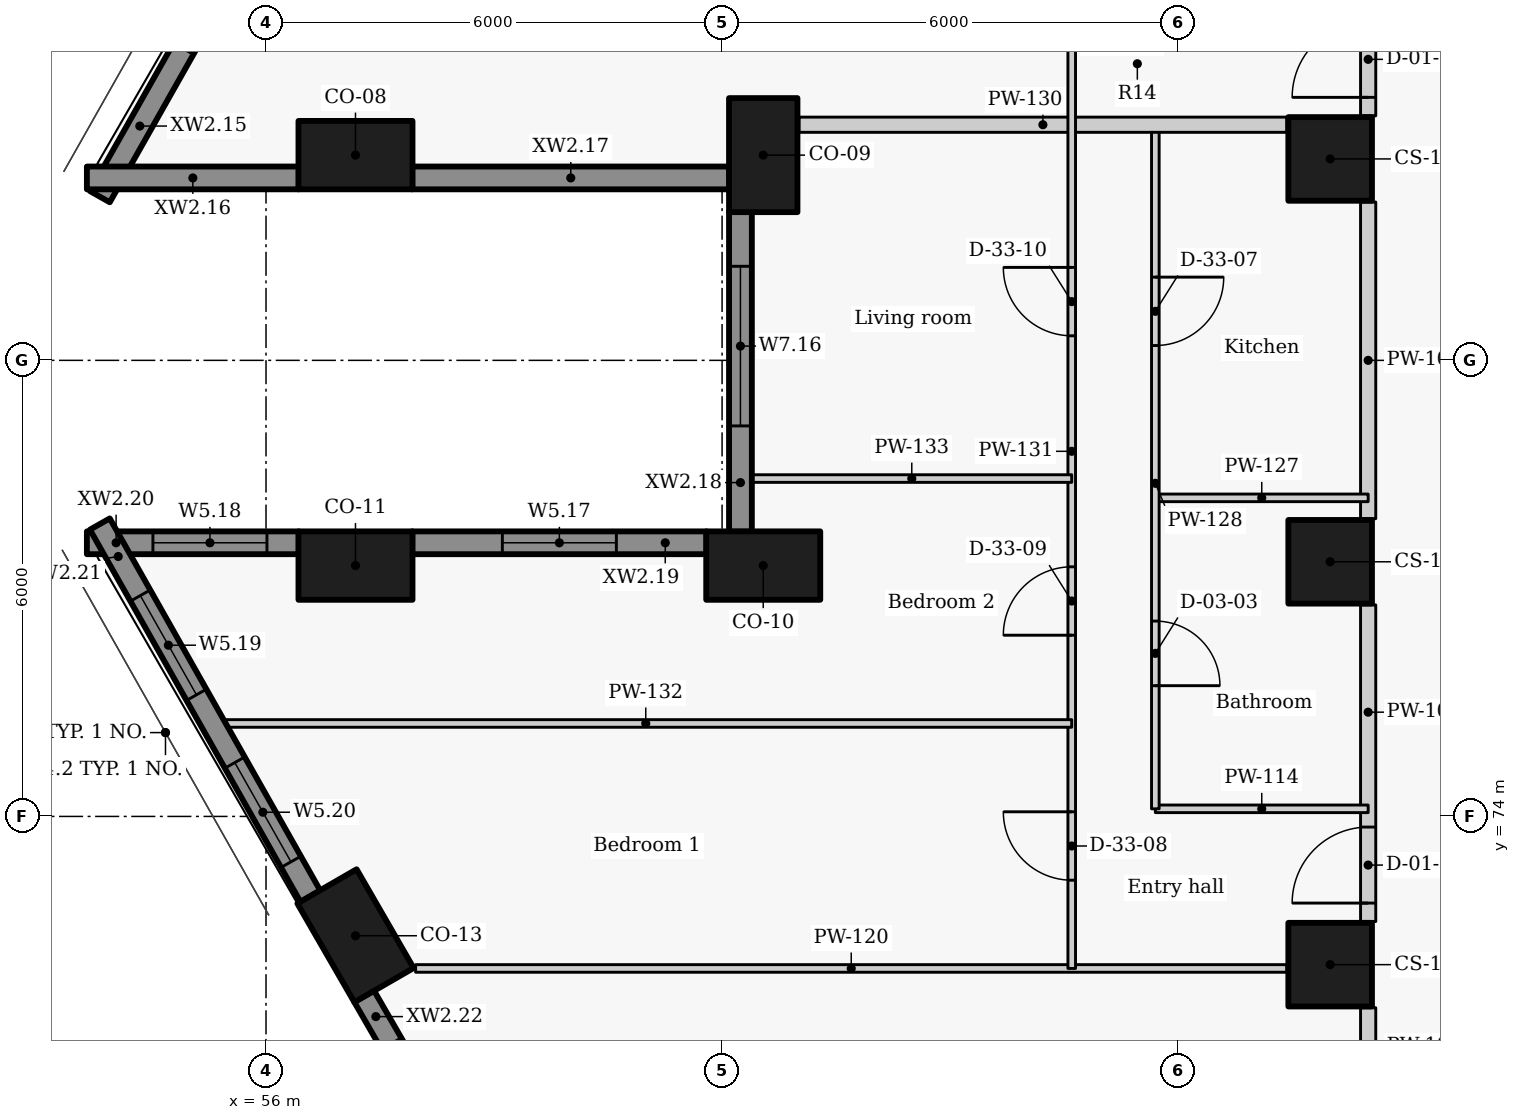
"""IFC4 building model, lengths in metres.
Left out: names, types, materials, properties, quantities, classifications, styles, units other than length and angle.
Written with IfcOpenShell. Run it as: python <this file> out.ifc"""

import sys

from ifc_helpers import new_model, si_unit, direction, frame, frame_2d, origin, origin_2d, place, context, subcontext, project, spatial, rectangle, extrude, element, fill, save


model = new_model("IFC4")
c1 = context("Model", 3, precision=1e-05, world=origin(), true_north=direction((0.0, 1.0)))
c2 = subcontext(c1, "Body", "Model", "MODEL_VIEW")
j1 = project(units=[si_unit("LENGTHUNIT", "METRE"), si_unit("PLANEANGLEUNIT", "RADIAN")], contexts=[c1])
p1 = place(None, origin())
s1 = spatial("IfcSite", under=j1, at=p1, CompositionType="ELEMENT")
p2 = place(p1, origin())
s2 = spatial("IfcBuilding", under=s1, at=p2, CompositionType="ELEMENT")
p3 = place(p2, frame((0.0, 0.0, 41.4)))
s3 = spatial("IfcBuildingStorey", under=s2, at=p3, CompositionType="ELEMENT", Elevation=41.4)
for number, where, z_axis, x_axis in (
    (1, (57.177, 82.7, -0.275), (0.0, 0.0, 1.0), (1.0, 0.0, 0.0)),
    (2, (62.542, 82.7, -0.275), (0.0, 0.0, 1.0), (0.0, -1.0, 0.0)),
    (3, (62.542, 77.3, -0.275), (0.0, 0.0, 1.0), (-1.0, 0.0, 0.0)),
    (4, (57.177, 77.3, -0.275), (0.0, 0.0, 1.0), (-1.0, 0.0, 0.0)),
    (5, (57.177, 72.43, -0.275), (0.0, 0.0, 1.0), (0.5, -0.866, 0.0)),
):
    element("IfcColumn", number, at=place(p3, frame(where, z_axis=z_axis, x_axis=x_axis)), inside=s3, PredefinedType="COLUMN", context=c2, shape_type="SweptSolid", body=[
        extrude(rectangle(XDim=1.5, YDim=0.9, at=origin_2d()), origin(), (0.0, 0.0, 1.0), 3.575),
    ])
for number, where, z_axis, x_axis in (
    (6, (70.0, 82.65, -0.275), (0.0, 0.0, 1.0), (0.0, -1.0, 0.0)),
    (7, (70.0, 77.35, -0.275), (0.0, 0.0, 1.0), (0.0, -1.0, 0.0)),
):
    element("IfcColumn", number, at=place(p3, frame(where, z_axis=z_axis, x_axis=x_axis)), inside=s3, PredefinedType="COLUMN", context=c2, shape_type="SweptSolid", body=[
        extrude(rectangle(XDim=1.1, YDim=1.1, at=origin_2d()), origin(), (0.0, 0.0, 1.0), 3.575),
    ])
p4 = place(p3, frame((70.0, 72.05, 0.0), z_axis=(0.0, 0.0, 1.0), x_axis=(0.0, -1.0, 0.0)))
e8 = element("IfcColumn", 8, at=p4, inside=s3, PredefinedType="COLUMN", context=c2, shape_type="SweptSolid", body=[
    extrude(rectangle(XDim=1.1, YDim=1.1, at=origin_2d()), origin(), (0.0, 0.0, 1.0), 3.3),
])
p5 = place(p3, frame((56.584, 87.051, 0.0), z_axis=(0.0, 0.0, 1.0), x_axis=(-0.492363204642, -0.870389840655, 0.0)))
e9 = element("IfcWall", 9, at=p5, inside=s3, PredefinedType="SOLIDWALL", context=c2, shape_type="SweptSolid", body=[
    extrude(rectangle(XDim=5.626, YDim=0.3, at=frame_2d((2.813, 0.0))), origin(), (0.0, 0.0, 1.0), 2.425),
])
p6 = place(p5, frame((1.892, 0.0, 0.9)))
e10 = element("IfcOpeningElement", 10, at=p6, cuts=e9, PredefinedType="OPENING", context=c2, shape_type="SweptSolid", body=[
    extrude(rectangle(XDim=1.5, YDim=1.1, at=frame_2d((0.75, 0.55))), frame((0.0, 0.16, 0.0), z_axis=(0.0, -1.0, 0.0), x_axis=(1.0, 0.0, 0.0)), (0.0, 0.0, 1.0), 0.32),
])
p7 = place(p3, frame((53.643, 82.4, 0.0), z_axis=(0.0, 0.0, 1.0), x_axis=(1.0, 0.0, 0.0)))
e11 = element("IfcWall", 11, at=p7, inside=s3, PredefinedType="SOLIDWALL", context=c2, shape_type="SweptSolid", body=[
    extrude(rectangle(XDim=2.788, YDim=0.3, at=frame_2d((1.394, 0.0))), origin(), (0.0, 0.0, 1.0), 2.425),
])
p8 = place(p3, frame((57.923, 82.4, 0.0), z_axis=(0.0, 0.0, 1.0), x_axis=(1.0, 0.0, 0.0)))
e12 = element("IfcWall", 12, at=p8, inside=s3, PredefinedType="SOLIDWALL", context=c2, shape_type="SweptSolid", body=[
    extrude(rectangle(XDim=4.173, YDim=0.3, at=frame_2d((2.086, 0.0))), origin(), (0.0, 0.0, 1.0), 2.425),
])
p9 = place(p3, frame((62.242, 81.954, 0.0), z_axis=(0.0, 0.0, 1.0), x_axis=(0.0, -1.0, 0.0)))
e13 = element("IfcWall", 13, at=p9, inside=s3, PredefinedType="SOLIDWALL", context=c2, shape_type="SweptSolid", body=[
    extrude(rectangle(XDim=4.208, YDim=0.3, at=frame_2d((2.104, 0.0))), origin(), (0.0, 0.0, 1.0), 2.425),
])
p10 = place(p9, frame((0.716, 0.0, 0.9)))
e14 = element("IfcOpeningElement", 14, at=p10, cuts=e13, PredefinedType="OPENING", context=c2, shape_type="SweptSolid", body=[
    extrude(rectangle(XDim=2.1, YDim=1.1, at=frame_2d((1.05, 0.55))), frame((0.0, 0.16, 0.0), z_axis=(0.0, -1.0, 0.0), x_axis=(1.0, 0.0, 0.0)), (0.0, 0.0, 1.0), 0.32),
])
p11 = place(p3, frame((61.796, 77.6, 0.0), z_axis=(0.0, 0.0, 1.0), x_axis=(-1.0, 0.0, 0.0)))
e15 = element("IfcWall", 15, at=p11, inside=s3, PredefinedType="SOLIDWALL", context=c2, shape_type="SweptSolid", body=[
    extrude(rectangle(XDim=3.873, YDim=0.3, at=frame_2d((1.936, 0.0))), origin(), (0.0, 0.0, 1.0), 2.425),
])
p12 = place(p11, frame((1.186, 0.0, 0.9)))
e16 = element("IfcOpeningElement", 16, at=p12, cuts=e15, PredefinedType="OPENING", context=c2, shape_type="SweptSolid", body=[
    extrude(rectangle(XDim=1.5, YDim=1.1, at=frame_2d((0.75, 0.55))), frame((0.0, 0.16, 0.0), z_axis=(0.0, -1.0, 0.0), x_axis=(1.0, 0.0, 0.0)), (0.0, 0.0, 1.0), 0.32),
])
p13 = place(p3, frame((56.431, 77.6, 0.0), z_axis=(0.0, 0.0, 1.0), x_axis=(-1.0, 0.0, 0.0)))
e17 = element("IfcWall", 17, at=p13, inside=s3, PredefinedType="SOLIDWALL", context=c2, shape_type="SweptSolid", body=[
    extrude(rectangle(XDim=2.788, YDim=0.3, at=frame_2d((1.394, 0.0))), origin(), (0.0, 0.0, 1.0), 2.425),
])
p14 = place(p13, frame((0.419, 0.0, 0.9)))
e18 = element("IfcOpeningElement", 18, at=p14, cuts=e17, PredefinedType="OPENING", context=c2, shape_type="SweptSolid", body=[
    extrude(rectangle(XDim=1.5, YDim=1.1, at=frame_2d((0.75, 0.55))), frame((0.0, 0.16, 0.0), z_axis=(0.0, -1.0, 0.0), x_axis=(1.0, 0.0, 0.0)), (0.0, 0.0, 1.0), 0.32),
])
p15 = place(p3, frame((53.814, 77.847, 0.0), z_axis=(0.0, 0.0, 1.0), x_axis=(0.492363204642, -0.870389840655, 0.0)))
e19 = element("IfcWall", 19, at=p15, inside=s3, PredefinedType="SOLIDWALL", context=c2, shape_type="SweptSolid", body=[
    extrude(rectangle(XDim=5.626, YDim=0.3, at=frame_2d((2.813, 0.0))), origin(), (0.0, 0.0, 1.0), 2.425),
])
p16 = place(p15, frame((1.081, 0.0, 0.9)))
e20 = element("IfcOpeningElement", 20, at=p16, cuts=e19, PredefinedType="OPENING", context=c2, shape_type="SweptSolid", body=[
    extrude(rectangle(XDim=1.5, YDim=1.1, at=frame_2d((0.75, 0.55))), frame((0.0, 0.16, 0.0), z_axis=(0.0, -1.0, 0.0), x_axis=(1.0, 0.0, 0.0)), (0.0, 0.0, 1.0), 0.32),
])
p17 = place(p15, frame((3.606, 0.0, 0.9)))
e21 = element("IfcOpeningElement", 21, at=p17, cuts=e19, PredefinedType="OPENING", context=c2, shape_type="SweptSolid", body=[
    extrude(rectangle(XDim=1.5, YDim=1.1, at=frame_2d((0.75, 0.55))), frame((0.0, 0.16, 0.0), z_axis=(0.0, -1.0, 0.0), x_axis=(1.0, 0.0, 0.0)), (0.0, 0.0, 1.0), 0.32),
])
p18 = place(p3, frame((57.29, 71.634, 0.0), z_axis=(0.0, 0.0, 1.0), x_axis=(0.499977402622, -0.866038449993, 0.0)))
e22 = element("IfcWall", 22, at=p18, inside=s3, PredefinedType="SOLIDWALL", context=c2, shape_type="SweptSolid", body=[
    extrude(rectangle(XDim=3.537, YDim=0.3, at=frame_2d((1.769, 0.0))), origin(), (0.0, 0.0, 1.0), 2.425),
])
p19 = place(p18, frame((0.719, 0.0, 0.9)))
e23 = element("IfcOpeningElement", 23, at=p19, cuts=e22, PredefinedType="OPENING", context=c2, shape_type="SweptSolid", body=[
    extrude(rectangle(XDim=2.1, YDim=1.1, at=frame_2d((1.05, 0.55))), frame((0.0, 0.16, 0.0), z_axis=(0.0, -1.0, 0.0), x_axis=(1.0, 0.0, 0.0)), (0.0, 0.0, 1.0), 0.32),
])
p20 = place(p3, frame((70.5, 68.267, 0.0), z_axis=(0.0, 0.0, 1.0), x_axis=(0.0, 1.0, 0.0)))
e24 = element("IfcWall", 24, at=p20, inside=s3, PredefinedType="PARTITIONING", context=c2, shape_type="SweptSolid", body=[
    extrude(rectangle(XDim=3.216, YDim=0.2, at=frame_2d((1.608, 0.0))), origin(), (0.0, 0.0, 1.0), 3.025),
])
p21 = place(p20, frame((1.108, 0.0, 0.0)))
e25 = element("IfcOpeningElement", 25, at=p21, cuts=e24, PredefinedType="OPENING", context=c2, shape_type="SweptSolid", body=[
    extrude(rectangle(XDim=1.0, YDim=2.1, at=frame_2d((0.5, 1.05))), frame((0.0, 0.11, 0.0), z_axis=(0.0, -1.0, 0.0), x_axis=(1.0, 0.0, 0.0)), (0.0, 0.0, 1.0), 0.22),
])
p22 = place(p3, frame((70.5, 72.617, 0.0), z_axis=(0.0, 0.0, 1.0), x_axis=(0.0, 1.0, 0.0)))
e26 = element("IfcWall", 26, at=p22, inside=s3, PredefinedType="PARTITIONING", context=c2, shape_type="SweptSolid", body=[
    extrude(rectangle(XDim=4.166, YDim=0.2, at=frame_2d((2.083, 0.0))), origin(), (0.0, 0.0, 1.0), 3.025),
])
p23 = place(p22, frame((0.243, 0.0, 0.0)))
e27 = element("IfcOpeningElement", 27, at=p23, cuts=e26, PredefinedType="OPENING", context=c2, shape_type="SweptSolid", body=[
    extrude(rectangle(XDim=1.0, YDim=2.1, at=frame_2d((0.5, 1.05))), frame((0.0, 0.11, 0.0), z_axis=(0.0, -1.0, 0.0), x_axis=(1.0, 0.0, 0.0)), (0.0, 0.0, 1.0), 0.22),
])
p24 = place(p3, frame((70.5, 77.917, 0.0), z_axis=(0.0, 0.0, 1.0), x_axis=(0.0, 1.0, 0.0)))
e28 = element("IfcWall", 28, at=p24, inside=s3, PredefinedType="PARTITIONING", context=c2, shape_type="SweptSolid", body=[
    extrude(rectangle(XDim=4.166, YDim=0.2, at=frame_2d((2.083, 0.0))), origin(), (0.0, 0.0, 1.0), 3.025),
])
p25 = place(p3, frame((70.5, 83.217, 0.0), z_axis=(0.0, 0.0, 1.0), x_axis=(0.0, 1.0, 0.0)))
e29 = element("IfcWall", 29, at=p25, inside=s3, PredefinedType="PARTITIONING", context=c2, shape_type="SweptSolid", body=[
    extrude(rectangle(XDim=4.166, YDim=0.2, at=frame_2d((2.083, 0.0))), origin(), (0.0, 0.0, 1.0), 3.025),
])
p26 = place(p25, frame((0.243, 0.0, 0.0)))
e30 = element("IfcOpeningElement", 30, at=p26, cuts=e29, PredefinedType="OPENING", context=c2, shape_type="SweptSolid", body=[
    extrude(rectangle(XDim=1.0, YDim=2.1, at=frame_2d((0.5, 1.05))), frame((0.0, 0.11, 0.0), z_axis=(0.0, -1.0, 0.0), x_axis=(1.0, 0.0, 0.0)), (0.0, 0.0, 1.0), 0.22),
])
p27 = place(p3, frame((67.7, 74.1, 0.0), z_axis=(0.0, 0.0, 1.0), x_axis=(1.0, 0.0, 0.0)))
e31 = element("IfcWall", 31, at=p27, inside=s3, PredefinedType="PARTITIONING", context=c2, shape_type="SweptSolid", body=[
    extrude(rectangle(XDim=2.8, YDim=0.1, at=frame_2d((1.4, 0.0))), origin(), (0.0, 0.0, 1.0), 2.505),
])
p28 = place(p3, frame((57.968, 72.0, 0.0), z_axis=(0.0, 0.0, 1.0), x_axis=(1.0, 0.0, 0.0)))
e32 = element("IfcWall", 32, at=p28, inside=s3, PredefinedType="PARTITIONING", context=c2, shape_type="SweptSolid", body=[
    extrude(rectangle(XDim=11.462, YDim=0.1, at=frame_2d((5.731, 0.0))), origin(), (0.0, 0.0, 1.0), 3.025),
])
p29 = place(p3, frame((67.7, 78.191, 0.0), z_axis=(0.0, 0.0, 1.0), x_axis=(1.0, 0.0, 0.0)))
e33 = element("IfcWall", 33, at=p29, inside=s3, PredefinedType="PARTITIONING", context=c2, shape_type="SweptSolid", body=[
    extrude(rectangle(XDim=2.8, YDim=0.1, at=frame_2d((1.4, 0.0))), origin(), (0.0, 0.0, 1.0), 2.505),
])
p30 = place(p3, frame((67.7, 83.1, 0.0), z_axis=(0.0, 0.0, 1.0), x_axis=(0.0, -1.0, 0.0)))
e34 = element("IfcWall", 34, at=p30, inside=s3, PredefinedType="PARTITIONING", context=c2, shape_type="SweptSolid", body=[
    extrude(rectangle(XDim=9.0, YDim=0.1, at=frame_2d((4.5, 0.0))), origin(), (0.0, 0.0, 1.0), 3.025),
])
p31 = place(p30, frame((6.53, 0.0, 0.0)))
e35 = element("IfcOpeningElement", 35, at=p31, cuts=e34, PredefinedType="OPENING", context=c2, shape_type="SweptSolid", body=[
    extrude(rectangle(XDim=0.85, YDim=2.1, at=frame_2d((0.425, 1.05))), frame((0.0, 0.06, 0.0), z_axis=(0.0, -1.0, 0.0), x_axis=(1.0, 0.0, 0.0)), (0.0, 0.0, 1.0), 0.12),
])
p32 = place(p30, frame((2.005, 0.0, 0.0)))
e36 = element("IfcOpeningElement", 36, at=p32, cuts=e34, PredefinedType="OPENING", context=c2, shape_type="SweptSolid", body=[
    extrude(rectangle(XDim=0.9, YDim=2.1, at=frame_2d((0.45, 1.05))), frame((0.0, 0.06, 0.0), z_axis=(0.0, -1.0, 0.0), x_axis=(1.0, 0.0, 0.0)), (0.0, 0.0, 1.0), 0.12),
])
p33 = place(p3, frame((63.012, 83.1, 0.0), z_axis=(0.0, 0.0, 1.0), x_axis=(1.0, 0.0, 0.0)))
e37 = element("IfcWall", 37, at=p33, inside=s3, PredefinedType="PARTITIONING", context=c2, shape_type="SweptSolid", body=[
    extrude(rectangle(XDim=6.418, YDim=0.2, at=frame_2d((3.209, 0.0))), origin(), (0.0, 0.0, 1.0), 3.025),
])
p34 = place(p3, frame((66.6, 72.0, 0.0), z_axis=(0.0, 0.0, 1.0), x_axis=(0.0, 1.0, 0.0)))
e38 = element("IfcWall", 38, at=p34, inside=s3, PredefinedType="PARTITIONING", context=c2, shape_type="SweptSolid", body=[
    extrude(rectangle(XDim=21.9, YDim=0.1, at=frame_2d((10.95, 0.0))), origin(), (0.0, 0.0, 1.0), 3.025),
])
p35 = place(p34, frame((1.161, 0.0, 0.0)))
e39 = element("IfcOpeningElement", 39, at=p35, cuts=e38, PredefinedType="OPENING", context=c2, shape_type="SweptSolid", body=[
    extrude(rectangle(XDim=0.9, YDim=2.1, at=frame_2d((0.45, 1.05))), frame((0.0, 0.06, 0.0), z_axis=(0.0, -1.0, 0.0), x_axis=(1.0, 0.0, 0.0)), (0.0, 0.0, 1.0), 0.12),
])
p36 = place(p34, frame((4.384, 0.0, 0.0)))
e40 = element("IfcOpeningElement", 40, at=p36, cuts=e38, PredefinedType="OPENING", context=c2, shape_type="SweptSolid", body=[
    extrude(rectangle(XDim=0.9, YDim=2.1, at=frame_2d((0.45, 1.05))), frame((0.0, 0.06, 0.0), z_axis=(0.0, -1.0, 0.0), x_axis=(1.0, 0.0, 0.0)), (0.0, 0.0, 1.0), 0.12),
])
p37 = place(p34, frame((8.323, 0.0, 0.0)))
e41 = element("IfcOpeningElement", 41, at=p37, cuts=e38, PredefinedType="OPENING", context=c2, shape_type="SweptSolid", body=[
    extrude(rectangle(XDim=0.9, YDim=2.1, at=frame_2d((0.45, 1.05))), frame((0.0, 0.06, 0.0), z_axis=(0.0, -1.0, 0.0), x_axis=(1.0, 0.0, 0.0)), (0.0, 0.0, 1.0), 0.12),
])
p38 = place(p34, frame((12.218, 0.0, 0.0)))
e42 = element("IfcOpeningElement", 42, at=p38, cuts=e38, PredefinedType="OPENING", context=c2, shape_type="SweptSolid", body=[
    extrude(rectangle(XDim=0.9, YDim=2.1, at=frame_2d((0.45, 1.05))), frame((0.0, 0.06, 0.0), z_axis=(0.0, -1.0, 0.0), x_axis=(1.0, 0.0, 0.0)), (0.0, 0.0, 1.0), 0.12),
])
p39 = place(p34, frame((15.353, 0.0, 0.0)))
e43 = element("IfcOpeningElement", 43, at=p39, cuts=e38, PredefinedType="OPENING", context=c2, shape_type="SweptSolid", body=[
    extrude(rectangle(XDim=0.9, YDim=2.1, at=frame_2d((0.45, 1.05))), frame((0.0, 0.06, 0.0), z_axis=(0.0, -1.0, 0.0), x_axis=(1.0, 0.0, 0.0)), (0.0, 0.0, 1.0), 0.12),
])
p40 = place(p34, frame((19.186, 0.0, 0.0)))
e44 = element("IfcOpeningElement", 44, at=p40, cuts=e38, PredefinedType="OPENING", context=c2, shape_type="SweptSolid", body=[
    extrude(rectangle(XDim=0.9, YDim=2.1, at=frame_2d((0.45, 1.05))), frame((0.0, 0.06, 0.0), z_axis=(0.0, -1.0, 0.0), x_axis=(1.0, 0.0, 0.0)), (0.0, 0.0, 1.0), 0.12),
])
p41 = place(p3, frame((55.392, 75.223, 0.0), z_axis=(0.0, 0.0, 1.0), x_axis=(1.0, 0.0, 0.0)))
e45 = element("IfcWall", 45, at=p41, inside=s3, PredefinedType="PARTITIONING", context=c2, shape_type="SweptSolid", body=[
    extrude(rectangle(XDim=11.208, YDim=0.1, at=frame_2d((5.604, 0.0))), origin(), (0.0, 0.0, 1.0), 2.405),
])
p42 = place(p3, frame((62.392, 78.445, 0.0), z_axis=(0.0, 0.0, 1.0), x_axis=(1.0, 0.0, 0.0)))
e46 = element("IfcWall", 46, at=p42, inside=s3, PredefinedType="PARTITIONING", context=c2, shape_type="SweptSolid", body=[
    extrude(rectangle(XDim=4.208, YDim=0.1, at=frame_2d((2.104, 0.0))), origin(), (0.0, 0.0, 1.0), 2.405),
])
p43 = place(p10, origin())
e47 = element("IfcWindow", 47, at=p43, inside=s3, PartitioningType="SINGLE_PANEL", PredefinedType="WINDOW", context=c2, shape_type="SweptSolid", body=[
    extrude(rectangle(XDim=2.1, YDim=1.1, at=frame_2d((1.05, 0.55))), frame((0.0, 0.03, 0.0), z_axis=(0.0, -1.0, 0.0), x_axis=(1.0, 0.0, 0.0)), (0.0, 0.0, 1.0), 0.06),
])
fill(e14, e47)
p44 = place(p12, origin())
e48 = element("IfcWindow", 48, at=p44, inside=s3, PartitioningType="SINGLE_PANEL", PredefinedType="WINDOW", context=c2, shape_type="SweptSolid", body=[
    extrude(rectangle(XDim=1.5, YDim=1.1, at=frame_2d((0.75, 0.55))), frame((0.0, 0.03, 0.0), z_axis=(0.0, -1.0, 0.0), x_axis=(1.0, 0.0, 0.0)), (0.0, 0.0, 1.0), 0.06),
])
fill(e16, e48)
p45 = place(p14, origin())
e49 = element("IfcWindow", 49, at=p45, inside=s3, PartitioningType="SINGLE_PANEL", PredefinedType="WINDOW", context=c2, shape_type="SweptSolid", body=[
    extrude(rectangle(XDim=1.5, YDim=1.1, at=frame_2d((0.75, 0.55))), frame((0.0, 0.03, 0.0), z_axis=(0.0, -1.0, 0.0), x_axis=(1.0, 0.0, 0.0)), (0.0, 0.0, 1.0), 0.06),
])
fill(e18, e49)
p46 = place(p16, origin())
e50 = element("IfcWindow", 50, at=p46, inside=s3, PartitioningType="SINGLE_PANEL", PredefinedType="WINDOW", context=c2, shape_type="SweptSolid", body=[
    extrude(rectangle(XDim=1.5, YDim=1.1, at=frame_2d((0.75, 0.55))), frame((0.0, 0.03, 0.0), z_axis=(0.0, -1.0, 0.0), x_axis=(1.0, 0.0, 0.0)), (0.0, 0.0, 1.0), 0.06),
])
fill(e20, e50)
p47 = place(p17, origin())
e51 = element("IfcWindow", 51, at=p47, inside=s3, PartitioningType="SINGLE_PANEL", PredefinedType="WINDOW", context=c2, shape_type="SweptSolid", body=[
    extrude(rectangle(XDim=1.5, YDim=1.1, at=frame_2d((0.75, 0.55))), frame((0.0, 0.03, 0.0), z_axis=(0.0, -1.0, 0.0), x_axis=(1.0, 0.0, 0.0)), (0.0, 0.0, 1.0), 0.06),
])
fill(e21, e51)
p48 = place(p23, origin())
e52 = element("IfcDoor", 52, at=p48, inside=s3, OperationType="SINGLE_SWING_LEFT", PredefinedType="DOOR", context=c2, shape_type="SweptSolid", body=[
    extrude(rectangle(XDim=1.0, YDim=2.1, at=frame_2d((0.5, 1.05))), frame((0.0, 0.025, 0.0), z_axis=(0.0, -1.0, 0.0), x_axis=(1.0, 0.0, 0.0)), (0.0, 0.0, 1.0), 0.05),
])
fill(e27, e52)
p49 = place(p31, origin())
e53 = element("IfcDoor", 53, at=p49, inside=s3, OperationType="SINGLE_SWING_RIGHT", PredefinedType="DOOR", context=c2, shape_type="SweptSolid", body=[
    extrude(rectangle(XDim=0.85, YDim=2.1, at=frame_2d((0.425, 1.05))), frame((0.0, 0.025, 0.0), z_axis=(0.0, -1.0, 0.0), x_axis=(1.0, 0.0, 0.0)), (0.0, 0.0, 1.0), 0.05),
])
fill(e35, e53)
p50 = place(p32, origin())
e54 = element("IfcDoor", 54, at=p50, inside=s3, OperationType="SINGLE_SWING_LEFT", PredefinedType="DOOR", context=c2, shape_type="SweptSolid", body=[
    extrude(rectangle(XDim=0.9, YDim=2.1, at=frame_2d((0.45, 1.05))), frame((0.0, 0.025, 0.0), z_axis=(0.0, -1.0, 0.0), x_axis=(1.0, 0.0, 0.0)), (0.0, 0.0, 1.0), 0.05),
])
fill(e36, e54)
p51 = place(p35, origin())
e55 = element("IfcDoor", 55, at=p51, inside=s3, OperationType="SINGLE_SWING_RIGHT", PredefinedType="DOOR", context=c2, shape_type="SweptSolid", body=[
    extrude(rectangle(XDim=0.9, YDim=2.1, at=frame_2d((0.45, 1.05))), frame((0.0, 0.025, 0.0), z_axis=(0.0, -1.0, 0.0), x_axis=(1.0, 0.0, 0.0)), (0.0, 0.0, 1.0), 0.05),
])
fill(e39, e55)
p52 = place(p36, origin())
e56 = element("IfcDoor", 56, at=p52, inside=s3, OperationType="SINGLE_SWING_LEFT", PredefinedType="DOOR", context=c2, shape_type="SweptSolid", body=[
    extrude(rectangle(XDim=0.9, YDim=2.1, at=frame_2d((0.45, 1.05))), frame((0.0, 0.025, 0.0), z_axis=(0.0, -1.0, 0.0), x_axis=(1.0, 0.0, 0.0)), (0.0, 0.0, 1.0), 0.05),
])
fill(e40, e56)
p53 = place(p37, origin())
e57 = element("IfcDoor", 57, at=p53, inside=s3, OperationType="SINGLE_SWING_RIGHT", PredefinedType="DOOR", context=c2, shape_type="SweptSolid", body=[
    extrude(rectangle(XDim=0.9, YDim=2.1, at=frame_2d((0.45, 1.05))), frame((0.0, 0.025, 0.0), z_axis=(0.0, -1.0, 0.0), x_axis=(1.0, 0.0, 0.0)), (0.0, 0.0, 1.0), 0.05),
])
fill(e41, e57)
p54 = place(p26, origin())
e58 = element("IfcDoor", 58, at=p54, inside=s3, OperationType="SINGLE_SWING_LEFT", PredefinedType="DOOR", context=c2, shape_type="SweptSolid", body=[
    extrude(rectangle(XDim=1.0, YDim=2.1, at=frame_2d((0.5, 1.05))), frame((0.0, 0.025, 0.0), z_axis=(0.0, -1.0, 0.0), x_axis=(1.0, 0.0, 0.0)), (0.0, 0.0, 1.0), 0.05),
])
fill(e30, e58)
save(model, sys.argv[1])
